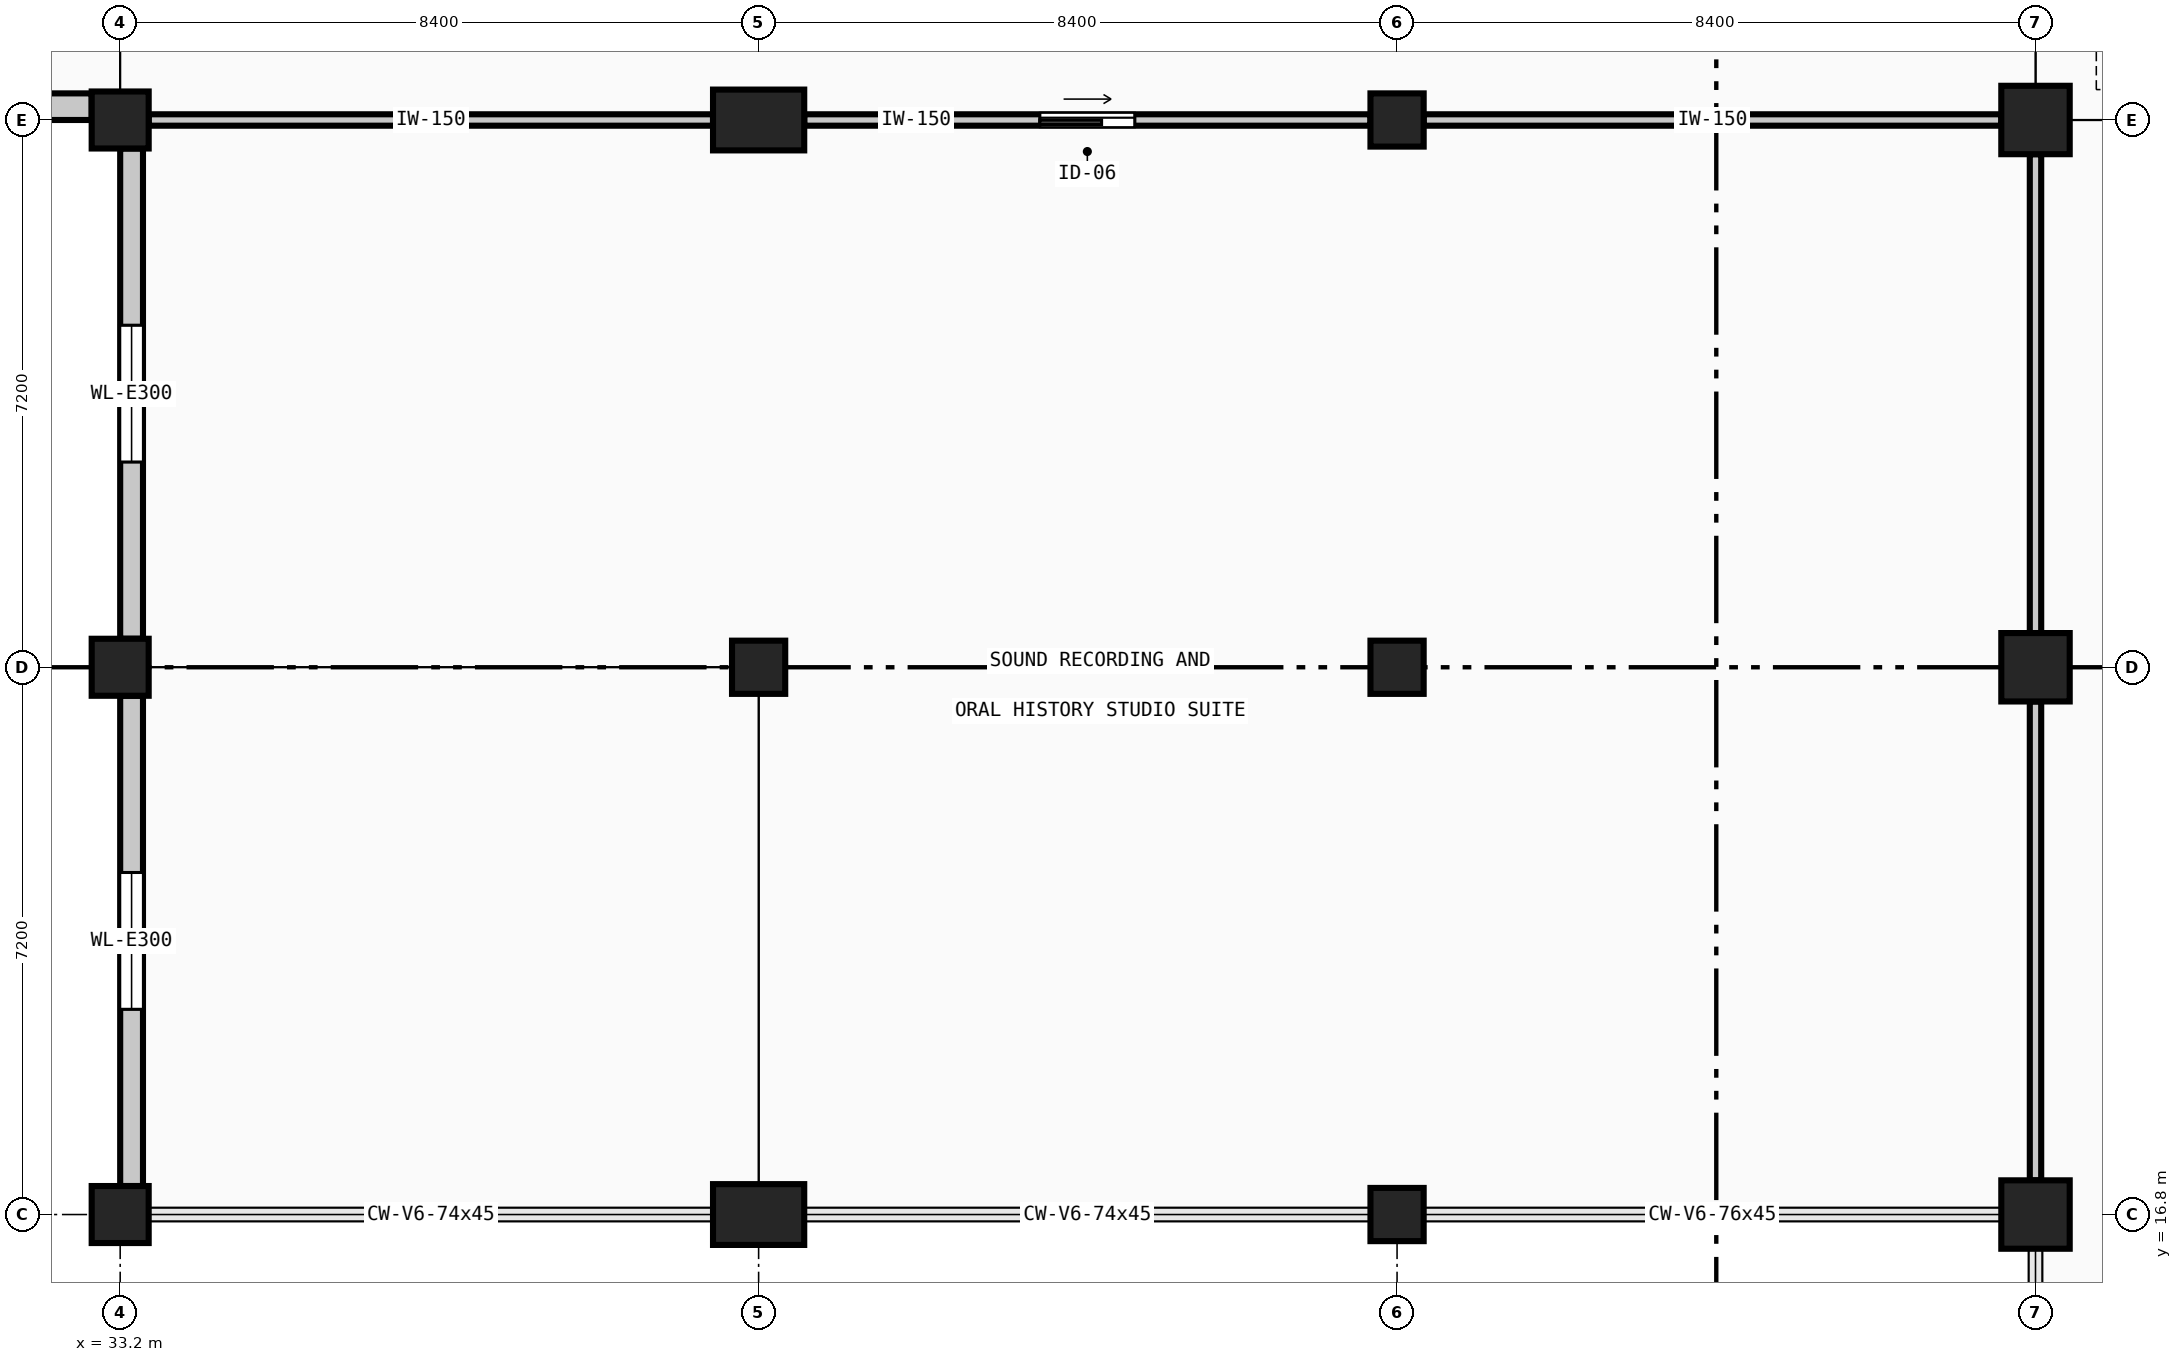
"""IFC4 building model, lengths in metres.
Left out: names, types, materials, properties, quantities, classifications, styles, units other than length and angle.
Written with IfcOpenShell. Run it as: python <this file> out.ifc"""

import sys

from ifc_helpers import new_model, si_unit, direction, frame, frame_2d, origin, origin_2d, place, context, subcontext, project, spatial, rectangle, extrude, element, fill, save


model = new_model("IFC4")
c1 = context("Model", 3, precision=1e-05, world=origin(), true_north=direction((0.0, 1.0)))
c2 = subcontext(c1, "Body", "Model", "MODEL_VIEW")
j1 = project(units=[si_unit("LENGTHUNIT", "METRE"), si_unit("PLANEANGLEUNIT", "RADIAN")], contexts=[c1])
p1 = place(None, origin())
s1 = spatial("IfcSite", under=j1, at=p1, CompositionType="ELEMENT")
p2 = place(p1, origin())
s2 = spatial("IfcBuilding", under=s1, at=p2, CompositionType="ELEMENT")
p3 = place(p2, frame((0.0, 0.0, 9.6)))
s3 = spatial("IfcBuildingStorey", under=s2, at=p3, CompositionType="ELEMENT", Elevation=9.6)
for number, where, z_axis, x_axis in (
    (1, (33.2, 16.8, 0.0), (0.0, 0.0, 1.0), (1.0, 0.0, 0.0)),
    (2, (33.2, 24.0, 0.0), (0.0, 0.0, 1.0), (1.0, 0.0, 0.0)),
    (3, (33.2, 31.2, 0.0), (0.0, 0.0, 1.0), (1.0, 0.0, 0.0)),
):
    element("IfcColumn", number, at=place(p3, frame(where, z_axis=z_axis, x_axis=x_axis)), inside=s3, PredefinedType="COLUMN", context=c2, shape_type="SweptSolid", body=[
        extrude(rectangle(XDim=0.75, YDim=0.75, at=origin_2d()), origin(), (0.0, 0.0, 1.0), 4.8),
    ])
p4 = place(p3, frame((41.6, 16.8, 0.0), z_axis=(0.0, 0.0, 1.0), x_axis=(1.0, 0.0, 0.0)))
e4 = element("IfcColumn", 4, at=p4, inside=s3, PredefinedType="COLUMN", context=c2, shape_type="SweptSolid", body=[
    extrude(rectangle(XDim=1.2, YDim=0.8, at=origin_2d()), origin(), (0.0, 0.0, 1.0), 4.8),
])
p5 = place(p3, frame((41.6, 24.0, 0.0), z_axis=(0.0, 0.0, 1.0), x_axis=(1.0, 0.0, 0.0)))
e5 = element("IfcColumn", 5, at=p5, inside=s3, PredefinedType="COLUMN", context=c2, shape_type="SweptSolid", body=[
    extrude(rectangle(XDim=0.7, YDim=0.7, at=origin_2d()), origin(), (0.0, 0.0, 1.0), 4.8),
])
p6 = place(p3, frame((41.6, 31.2, 0.0), z_axis=(0.0, 0.0, 1.0), x_axis=(1.0, 0.0, 0.0)))
e6 = element("IfcColumn", 6, at=p6, inside=s3, PredefinedType="COLUMN", context=c2, shape_type="SweptSolid", body=[
    extrude(rectangle(XDim=1.2, YDim=0.8, at=origin_2d()), origin(), (0.0, 0.0, 1.0), 4.8),
])
for number, where, z_axis, x_axis in (
    (7, (50.0, 16.8, 0.0), (0.0, 0.0, 1.0), (1.0, 0.0, 0.0)),
    (8, (50.0, 24.0, 0.0), (0.0, 0.0, 1.0), (1.0, 0.0, 0.0)),
    (9, (50.0, 31.2, 0.0), (0.0, 0.0, 1.0), (1.0, 0.0, 0.0)),
):
    element("IfcColumn", number, at=place(p3, frame(where, z_axis=z_axis, x_axis=x_axis)), inside=s3, PredefinedType="COLUMN", context=c2, shape_type="SweptSolid", body=[
        extrude(rectangle(XDim=0.7, YDim=0.7, at=origin_2d()), origin(), (0.0, 0.0, 1.0), 4.8),
    ])
for number, where, z_axis, x_axis in (
    (10, (58.4, 16.8, 0.0), (0.0, 0.0, 1.0), (1.0, 0.0, 0.0)),
    (11, (58.4, 24.0, 0.0), (0.0, 0.0, 1.0), (1.0, 0.0, 0.0)),
    (12, (58.4, 31.2, 0.0), (0.0, 0.0, 1.0), (1.0, 0.0, 0.0)),
):
    element("IfcColumn", number, at=place(p3, frame(where, z_axis=z_axis, x_axis=x_axis)), inside=s3, PredefinedType="COLUMN", context=c2, shape_type="SweptSolid", body=[
        extrude(rectangle(XDim=0.9, YDim=0.9, at=origin_2d()), origin(), (0.0, 0.0, 1.0), 4.8),
    ])
p7 = place(p3, frame((32.825, 31.375, 0.0), z_axis=(0.0, 0.0, 1.0), x_axis=(-1.0, 0.0, 0.0)))
e13 = element("IfcWall", 13, at=p7, inside=s3, PredefinedType="SOLIDWALL", context=c2, shape_type="SweptSolid", body=[
    extrude(rectangle(XDim=7.65, YDim=0.35, at=frame_2d((3.825, 0.0))), origin(), (0.0, 0.0, 1.0), 4.55),
])
p8 = place(p7, frame((2.925, 0.0, 2.2)))
e14 = element("IfcOpeningElement", 14, at=p8, cuts=e13, PredefinedType="OPENING", context=c2, shape_type="SweptSolid", body=[
    extrude(rectangle(XDim=1.8, YDim=1.35, at=frame_2d((0.9, 0.675))), frame((0.0, 0.185, 0.0), z_axis=(0.0, -1.0, 0.0), x_axis=(1.0, 0.0, 0.0)), (0.0, 0.0, 1.0), 0.37),
])
p9 = place(p3, frame((33.35, 17.175, 0.0), z_axis=(0.0, 0.0, 1.0), x_axis=(0.0, 1.0, 0.0)))
e15 = element("IfcWall", 15, at=p9, inside=s3, PredefinedType="SOLIDWALL", context=c2, shape_type="SweptSolid", body=[
    extrude(rectangle(XDim=6.45, YDim=0.3, at=frame_2d((3.225, 0.0))), origin(), (0.0, 0.0, 1.0), 4.55),
])
p10 = place(p9, frame((2.325, 0.0, 2.2)))
e16 = element("IfcOpeningElement", 16, at=p10, cuts=e15, PredefinedType="OPENING", context=c2, shape_type="SweptSolid", body=[
    extrude(rectangle(XDim=1.8, YDim=1.35, at=frame_2d((0.9, 0.675))), frame((0.0, 0.16, 0.0), z_axis=(0.0, -1.0, 0.0), x_axis=(1.0, 0.0, 0.0)), (0.0, 0.0, 1.0), 0.32),
])
p11 = place(p3, frame((33.35, 24.375, 0.0), z_axis=(0.0, 0.0, 1.0), x_axis=(0.0, 1.0, 0.0)))
e17 = element("IfcWall", 17, at=p11, inside=s3, PredefinedType="SOLIDWALL", context=c2, shape_type="SweptSolid", body=[
    extrude(rectangle(XDim=6.45, YDim=0.3, at=frame_2d((3.225, 0.0))), origin(), (0.0, 0.0, 1.0), 4.55),
])
p12 = place(p11, frame((2.325, 0.0, 2.2)))
e18 = element("IfcOpeningElement", 18, at=p12, cuts=e17, PredefinedType="OPENING", context=c2, shape_type="SweptSolid", body=[
    extrude(rectangle(XDim=1.8, YDim=1.35, at=frame_2d((0.9, 0.675))), frame((0.0, 0.16, 0.0), z_axis=(0.0, -1.0, 0.0), x_axis=(1.0, 0.0, 0.0)), (0.0, 0.0, 1.0), 0.32),
])
p13 = place(p3, frame((33.575, 31.2, 0.0), z_axis=(0.0, 0.0, 1.0), x_axis=(1.0, 0.0, 0.0)))
e19 = element("IfcWall", 19, at=p13, inside=s3, PredefinedType="PARTITIONING", context=c2, shape_type="SweptSolid", body=[
    extrude(rectangle(XDim=7.425, YDim=0.15, at=frame_2d((3.712, 0.0))), origin(), (0.0, 0.0, 1.0), 4.55),
])
p14 = place(p3, frame((42.2, 31.2, 0.0), z_axis=(0.0, 0.0, 1.0), x_axis=(1.0, 0.0, 0.0)))
e20 = element("IfcWall", 20, at=p14, inside=s3, PredefinedType="PARTITIONING", context=c2, shape_type="SweptSolid", body=[
    extrude(rectangle(XDim=7.45, YDim=0.15, at=frame_2d((3.725, 0.0))), origin(), (0.0, 0.0, 1.0), 4.15),
])
p15 = place(p14, frame((3.1, 0.0, 0.0)))
e21 = element("IfcOpeningElement", 21, at=p15, cuts=e20, PredefinedType="OPENING", context=c2, shape_type="SweptSolid", body=[
    extrude(rectangle(XDim=1.25, YDim=2.2, at=frame_2d((0.625, 1.1))), frame((0.0, 0.085, 0.0), z_axis=(0.0, -1.0, 0.0), x_axis=(1.0, 0.0, 0.0)), (0.0, 0.0, 1.0), 0.17),
])
p16 = place(p3, frame((50.35, 31.2, 0.0), z_axis=(0.0, 0.0, 1.0), x_axis=(1.0, 0.0, 0.0)))
e22 = element("IfcWall", 22, at=p16, inside=s3, PredefinedType="PARTITIONING", context=c2, shape_type="SweptSolid", body=[
    extrude(rectangle(XDim=7.6, YDim=0.15, at=frame_2d((3.8, 0.0))), origin(), (0.0, 0.0, 1.0), 4.15),
])
for number, where, z_axis, x_axis in (
    (23, (58.4, 30.75, 0.0), (0.0, 0.0, 1.0), (0.0, -1.0, 0.0)),
    (24, (58.4, 23.55, 0.0), (0.0, 0.0, 1.0), (0.0, -1.0, 0.0)),
):
    element("IfcWall", number, at=place(p3, frame(where, z_axis=z_axis, x_axis=x_axis)), inside=s3, PredefinedType="PARTITIONING", context=c2, shape_type="SweptSolid", body=[
        extrude(rectangle(XDim=6.3, YDim=0.15, at=frame_2d((3.15, 0.0))), origin(), (0.0, 0.0, 1.0), 4.05),
    ])
p17 = place(p10, origin())
e25 = element("IfcWindow", 25, at=p17, inside=s3, PartitioningType="SINGLE_PANEL", PredefinedType="WINDOW", context=c2, shape_type="SweptSolid", body=[
    extrude(rectangle(XDim=1.8, YDim=1.35, at=frame_2d((0.9, 0.675))), frame((0.0, 0.03, 0.0), z_axis=(0.0, -1.0, 0.0), x_axis=(1.0, 0.0, 0.0)), (0.0, 0.0, 1.0), 0.06),
])
fill(e16, e25)
p18 = place(p12, origin())
e26 = element("IfcWindow", 26, at=p18, inside=s3, PartitioningType="SINGLE_PANEL", PredefinedType="WINDOW", context=c2, shape_type="SweptSolid", body=[
    extrude(rectangle(XDim=1.8, YDim=1.35, at=frame_2d((0.9, 0.675))), frame((0.0, 0.03, 0.0), z_axis=(0.0, -1.0, 0.0), x_axis=(1.0, 0.0, 0.0)), (0.0, 0.0, 1.0), 0.06),
])
fill(e18, e26)
p19 = place(p15, origin())
e27 = element("IfcDoor", 27, at=p19, inside=s3, OperationType="SLIDING_TO_RIGHT", PredefinedType="DOOR", context=c2, shape_type="SweptSolid", body=[
    extrude(rectangle(XDim=1.25, YDim=2.2, at=frame_2d((0.625, 1.1))), frame((0.0, 0.025, 0.0), z_axis=(0.0, -1.0, 0.0), x_axis=(1.0, 0.0, 0.0)), (0.0, 0.0, 1.0), 0.05),
])
fill(e21, e27)
save(model, sys.argv[1])
